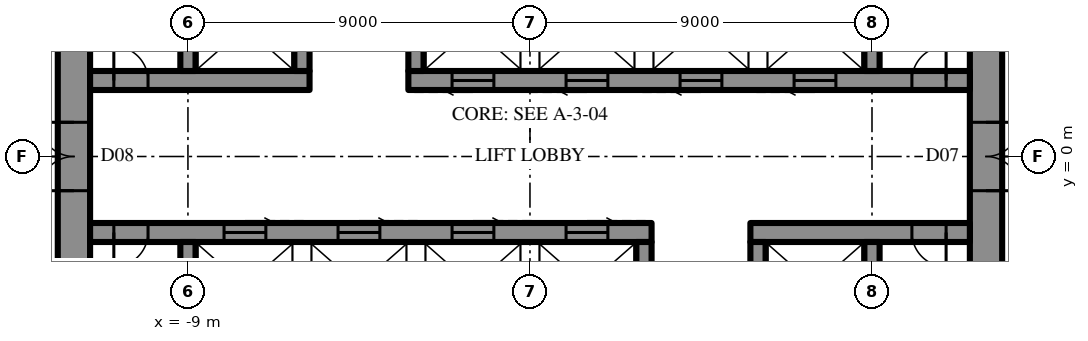
"""IFC4 building model, lengths in metres.
Left out: names, types, materials, properties, quantities, classifications, styles, units other than length and angle.
Written with IfcOpenShell. Run it as: python <this file> out.ifc"""

import sys

from ifc_helpers import new_model, si_unit, direction, frame, frame_2d, origin, place, context, subcontext, project, spatial, rectangle, extrude, element, fill, save


model = new_model("IFC4")
c1 = context("Model", 3, precision=1e-05, world=origin(), true_north=direction((0.0, 1.0)))
c2 = subcontext(c1, "Body", "Model", "MODEL_VIEW")
j1 = project(units=[si_unit("LENGTHUNIT", "METRE"), si_unit("PLANEANGLEUNIT", "RADIAN")], contexts=[c1])
p1 = place(None, origin())
s1 = spatial("IfcSite", under=j1, at=p1, CompositionType="ELEMENT")
p2 = place(p1, origin())
s2 = spatial("IfcBuilding", under=s1, at=p2, CompositionType="ELEMENT")
p3 = place(p2, frame((0.0, 0.0, 370.3)))
s3 = spatial("IfcBuildingStorey", under=s2, at=p3, CompositionType="ELEMENT", Elevation=370.3)
p4 = place(p3, frame((12.0, -10.7, 0.0), z_axis=(0.0, 0.0, 1.0), x_axis=(0.0, 1.0, 0.0)))
e1 = element("IfcWall", 1, at=p4, inside=s3, PredefinedType="SHEAR", context=c2, shape_type="SweptSolid", body=[
    extrude(rectangle(XDim=21.4, YDim=0.85, at=frame_2d((10.7, 0.0))), origin(), (0.0, 0.0, 1.0), 4.2),
])
p5 = place(p4, frame((9.8, 0.0, 0.0)))
e2 = element("IfcOpeningElement", 2, at=p5, cuts=e1, PredefinedType="OPENING", context=c2, shape_type="SweptSolid", body=[
    extrude(rectangle(XDim=1.8, YDim=2.4, at=frame_2d((0.9, 1.2))), frame((0.0, 0.435, 0.0), z_axis=(0.0, -1.0, 0.0), x_axis=(1.0, 0.0, 0.0)), (0.0, 0.0, 1.0), 0.87),
])
p6 = place(p3, frame((-12.0, 10.7, 0.0), z_axis=(0.0, 0.0, 1.0), x_axis=(0.0, -1.0, 0.0)))
e3 = element("IfcWall", 3, at=p6, inside=s3, PredefinedType="SHEAR", context=c2, shape_type="SweptSolid", body=[
    extrude(rectangle(XDim=21.4, YDim=0.85, at=frame_2d((10.7, 0.0))), origin(), (0.0, 0.0, 1.0), 4.2),
])
p7 = place(p6, frame((9.8, 0.0, 0.0)))
e4 = element("IfcOpeningElement", 4, at=p7, cuts=e3, PredefinedType="OPENING", context=c2, shape_type="SweptSolid", body=[
    extrude(rectangle(XDim=1.8, YDim=2.4, at=frame_2d((0.9, 1.2))), frame((0.0, 0.435, 0.0), z_axis=(0.0, -1.0, 0.0), x_axis=(1.0, 0.0, 0.0)), (0.0, 0.0, 1.0), 0.87),
])
p8 = place(p3, frame((-11.575, 2.0, 0.0), z_axis=(0.0, 0.0, 1.0), x_axis=(1.0, 0.0, 0.0)))
e5 = element("IfcWall", 5, at=p8, inside=s3, PredefinedType="SHEAR", context=c2, shape_type="SweptSolid", body=[
    extrude(rectangle(XDim=5.775, YDim=0.5, at=frame_2d((2.887, 0.0))), origin(), (0.0, 0.0, 1.0), 4.2),
])
p9 = place(p8, frame((0.625, 0.0, 0.0)))
e6 = element("IfcOpeningElement", 6, at=p9, cuts=e5, PredefinedType="OPENING", context=c2, shape_type="SweptSolid", body=[
    extrude(rectangle(XDim=0.9, YDim=2.2, at=frame_2d((0.45, 1.1))), frame((0.0, 0.26, 0.0), z_axis=(0.0, -1.0, 0.0), x_axis=(1.0, 0.0, 0.0)), (0.0, 0.0, 1.0), 0.52),
])
p10 = place(p3, frame((-3.2, 2.0, 0.0), z_axis=(0.0, 0.0, 1.0), x_axis=(1.0, 0.0, 0.0)))
e7 = element("IfcWall", 7, at=p10, inside=s3, PredefinedType="SHEAR", context=c2, shape_type="SweptSolid", body=[
    extrude(rectangle(XDim=14.775, YDim=0.5, at=frame_2d((7.387, 0.0))), origin(), (0.0, 0.0, 1.0), 4.2),
])
p11 = place(p10, frame((13.25, 0.0, 0.0)))
e8 = element("IfcOpeningElement", 8, at=p11, cuts=e7, PredefinedType="OPENING", context=c2, shape_type="SweptSolid", body=[
    extrude(rectangle(XDim=0.9, YDim=2.2, at=frame_2d((0.45, 1.1))), frame((0.0, 0.26, 0.0), z_axis=(0.0, -1.0, 0.0), x_axis=(1.0, 0.0, 0.0)), (0.0, 0.0, 1.0), 0.52),
])
p12 = place(p10, frame((1.15, 0.0, 0.0)))
e9 = element("IfcOpeningElement", 9, at=p12, cuts=e7, PredefinedType="OPENING", context=c2, shape_type="SweptSolid", body=[
    extrude(rectangle(XDim=1.1, YDim=2.2, at=frame_2d((0.55, 1.1))), frame((0.0, 0.26, 0.0), z_axis=(0.0, -1.0, 0.0), x_axis=(1.0, 0.0, 0.0)), (0.0, 0.0, 1.0), 0.52),
])
p13 = place(p10, frame((4.15, 0.0, 0.0)))
e10 = element("IfcOpeningElement", 10, at=p13, cuts=e7, PredefinedType="OPENING", context=c2, shape_type="SweptSolid", body=[
    extrude(rectangle(XDim=1.1, YDim=2.2, at=frame_2d((0.55, 1.1))), frame((0.0, 0.26, 0.0), z_axis=(0.0, -1.0, 0.0), x_axis=(1.0, 0.0, 0.0)), (0.0, 0.0, 1.0), 0.52),
])
p14 = place(p10, frame((7.15, 0.0, 0.0)))
e11 = element("IfcOpeningElement", 11, at=p14, cuts=e7, PredefinedType="OPENING", context=c2, shape_type="SweptSolid", body=[
    extrude(rectangle(XDim=1.1, YDim=2.2, at=frame_2d((0.55, 1.1))), frame((0.0, 0.26, 0.0), z_axis=(0.0, -1.0, 0.0), x_axis=(1.0, 0.0, 0.0)), (0.0, 0.0, 1.0), 0.52),
])
p15 = place(p10, frame((10.15, 0.0, 0.0)))
e12 = element("IfcOpeningElement", 12, at=p15, cuts=e7, PredefinedType="OPENING", context=c2, shape_type="SweptSolid", body=[
    extrude(rectangle(XDim=1.1, YDim=2.2, at=frame_2d((0.55, 1.1))), frame((0.0, 0.26, 0.0), z_axis=(0.0, -1.0, 0.0), x_axis=(1.0, 0.0, 0.0)), (0.0, 0.0, 1.0), 0.52),
])
for number, where, z_axis, x_axis in (
    (13, (-9.0, 2.25, 0.0), (0.0, 0.0, 1.0), (0.0, 1.0, 0.0)),
    (14, (-6.0, 2.25, 0.0), (0.0, 0.0, 1.0), (0.0, 1.0, 0.0)),
    (15, (-3.0, 2.25, 0.0), (0.0, 0.0, 1.0), (0.0, 1.0, 0.0)),
    (16, (9.0, 2.25, 0.0), (0.0, 0.0, 1.0), (0.0, 1.0, 0.0)),
):
    element("IfcWall", number, at=place(p3, frame(where, z_axis=z_axis, x_axis=x_axis)), inside=s3, PredefinedType="SHEAR", context=c2, shape_type="SweptSolid", body=[
        extrude(rectangle(XDim=2.3, YDim=0.4, at=frame_2d((1.15, 0.0))), origin(), (0.0, 0.0, 1.0), 4.2),
    ])
p16 = place(p3, frame((11.575, -2.0, 0.0), z_axis=(0.0, 0.0, 1.0), x_axis=(-1.0, 0.0, 0.0)))
e17 = element("IfcWall", 17, at=p16, inside=s3, PredefinedType="SHEAR", context=c2, shape_type="SweptSolid", body=[
    extrude(rectangle(XDim=5.775, YDim=0.5, at=frame_2d((2.887, 0.0))), origin(), (0.0, 0.0, 1.0), 4.2),
])
p17 = place(p16, frame((0.625, 0.0, 0.0)))
e18 = element("IfcOpeningElement", 18, at=p17, cuts=e17, PredefinedType="OPENING", context=c2, shape_type="SweptSolid", body=[
    extrude(rectangle(XDim=0.9, YDim=2.2, at=frame_2d((0.45, 1.1))), frame((0.0, 0.26, 0.0), z_axis=(0.0, -1.0, 0.0), x_axis=(1.0, 0.0, 0.0)), (0.0, 0.0, 1.0), 0.52),
])
p18 = place(p3, frame((3.2, -2.0, 0.0), z_axis=(0.0, 0.0, 1.0), x_axis=(-1.0, 0.0, 0.0)))
e19 = element("IfcWall", 19, at=p18, inside=s3, PredefinedType="SHEAR", context=c2, shape_type="SweptSolid", body=[
    extrude(rectangle(XDim=14.775, YDim=0.5, at=frame_2d((7.387, 0.0))), origin(), (0.0, 0.0, 1.0), 4.2),
])
p19 = place(p18, frame((13.25, 0.0, 0.0)))
e20 = element("IfcOpeningElement", 20, at=p19, cuts=e19, PredefinedType="OPENING", context=c2, shape_type="SweptSolid", body=[
    extrude(rectangle(XDim=0.9, YDim=2.2, at=frame_2d((0.45, 1.1))), frame((0.0, 0.26, 0.0), z_axis=(0.0, -1.0, 0.0), x_axis=(1.0, 0.0, 0.0)), (0.0, 0.0, 1.0), 0.52),
])
p20 = place(p18, frame((1.15, 0.0, 0.0)))
e21 = element("IfcOpeningElement", 21, at=p20, cuts=e19, PredefinedType="OPENING", context=c2, shape_type="SweptSolid", body=[
    extrude(rectangle(XDim=1.1, YDim=2.2, at=frame_2d((0.55, 1.1))), frame((0.0, 0.26, 0.0), z_axis=(0.0, -1.0, 0.0), x_axis=(1.0, 0.0, 0.0)), (0.0, 0.0, 1.0), 0.52),
])
p21 = place(p18, frame((4.15, 0.0, 0.0)))
e22 = element("IfcOpeningElement", 22, at=p21, cuts=e19, PredefinedType="OPENING", context=c2, shape_type="SweptSolid", body=[
    extrude(rectangle(XDim=1.1, YDim=2.2, at=frame_2d((0.55, 1.1))), frame((0.0, 0.26, 0.0), z_axis=(0.0, -1.0, 0.0), x_axis=(1.0, 0.0, 0.0)), (0.0, 0.0, 1.0), 0.52),
])
p22 = place(p18, frame((7.15, 0.0, 0.0)))
e23 = element("IfcOpeningElement", 23, at=p22, cuts=e19, PredefinedType="OPENING", context=c2, shape_type="SweptSolid", body=[
    extrude(rectangle(XDim=1.1, YDim=2.2, at=frame_2d((0.55, 1.1))), frame((0.0, 0.26, 0.0), z_axis=(0.0, -1.0, 0.0), x_axis=(1.0, 0.0, 0.0)), (0.0, 0.0, 1.0), 0.52),
])
p23 = place(p18, frame((10.15, 0.0, 0.0)))
e24 = element("IfcOpeningElement", 24, at=p23, cuts=e19, PredefinedType="OPENING", context=c2, shape_type="SweptSolid", body=[
    extrude(rectangle(XDim=1.1, YDim=2.2, at=frame_2d((0.55, 1.1))), frame((0.0, 0.26, 0.0), z_axis=(0.0, -1.0, 0.0), x_axis=(1.0, 0.0, 0.0)), (0.0, 0.0, 1.0), 0.52),
])
for number, where, z_axis, x_axis in (
    (25, (9.0, -2.25, 0.0), (0.0, 0.0, 1.0), (0.0, -1.0, 0.0)),
    (26, (6.0, -2.25, 0.0), (0.0, 0.0, 1.0), (0.0, -1.0, 0.0)),
    (27, (3.0, -2.25, 0.0), (0.0, 0.0, 1.0), (0.0, -1.0, 0.0)),
    (28, (-9.0, -2.25, 0.0), (0.0, 0.0, 1.0), (0.0, -1.0, 0.0)),
):
    element("IfcWall", number, at=place(p3, frame(where, z_axis=z_axis, x_axis=x_axis)), inside=s3, PredefinedType="SHEAR", context=c2, shape_type="SweptSolid", body=[
        extrude(rectangle(XDim=2.3, YDim=0.4, at=frame_2d((1.15, 0.0))), origin(), (0.0, 0.0, 1.0), 4.2),
    ])
p24 = place(p5, frame((1.8, 0.0, 0.0), z_axis=(0.0, 0.0, 1.0), x_axis=(-1.0, 0.0, 0.0)))
e29 = element("IfcDoor", 29, at=p24, inside=s3, OperationType="DOUBLE_DOOR_SINGLE_SWING", PredefinedType="DOOR", context=c2, shape_type="SweptSolid", body=[
    extrude(rectangle(XDim=1.8, YDim=2.4, at=frame_2d((0.9, 1.2))), frame((0.0, 0.025, 0.0), z_axis=(0.0, -1.0, 0.0), x_axis=(1.0, 0.0, 0.0)), (0.0, 0.0, 1.0), 0.05),
])
fill(e2, e29)
p25 = place(p7, frame((1.8, 0.0, 0.0), z_axis=(0.0, 0.0, 1.0), x_axis=(-1.0, 0.0, 0.0)))
e30 = element("IfcDoor", 30, at=p25, inside=s3, OperationType="DOUBLE_DOOR_SINGLE_SWING", PredefinedType="DOOR", context=c2, shape_type="SweptSolid", body=[
    extrude(rectangle(XDim=1.8, YDim=2.4, at=frame_2d((0.9, 1.2))), frame((0.0, 0.025, 0.0), z_axis=(0.0, -1.0, 0.0), x_axis=(1.0, 0.0, 0.0)), (0.0, 0.0, 1.0), 0.05),
])
fill(e4, e30)
p26 = place(p9, origin())
e31 = element("IfcDoor", 31, at=p26, inside=s3, OperationType="SINGLE_SWING_RIGHT", PredefinedType="DOOR", context=c2, shape_type="SweptSolid", body=[
    extrude(rectangle(XDim=0.9, YDim=2.2, at=frame_2d((0.45, 1.1))), frame((0.0, 0.025, 0.0), z_axis=(0.0, -1.0, 0.0), x_axis=(1.0, 0.0, 0.0)), (0.0, 0.0, 1.0), 0.05),
])
fill(e6, e31)
p27 = place(p11, origin())
e32 = element("IfcDoor", 32, at=p27, inside=s3, OperationType="SINGLE_SWING_LEFT", PredefinedType="DOOR", context=c2, shape_type="SweptSolid", body=[
    extrude(rectangle(XDim=0.9, YDim=2.2, at=frame_2d((0.45, 1.1))), frame((0.0, 0.025, 0.0), z_axis=(0.0, -1.0, 0.0), x_axis=(1.0, 0.0, 0.0)), (0.0, 0.0, 1.0), 0.05),
])
fill(e8, e32)
p28 = place(p17, origin())
e33 = element("IfcDoor", 33, at=p28, inside=s3, OperationType="SINGLE_SWING_RIGHT", PredefinedType="DOOR", context=c2, shape_type="SweptSolid", body=[
    extrude(rectangle(XDim=0.9, YDim=2.2, at=frame_2d((0.45, 1.1))), frame((0.0, 0.025, 0.0), z_axis=(0.0, -1.0, 0.0), x_axis=(1.0, 0.0, 0.0)), (0.0, 0.0, 1.0), 0.05),
])
fill(e18, e33)
p29 = place(p19, origin())
e34 = element("IfcDoor", 34, at=p29, inside=s3, OperationType="SINGLE_SWING_LEFT", PredefinedType="DOOR", context=c2, shape_type="SweptSolid", body=[
    extrude(rectangle(XDim=0.9, YDim=2.2, at=frame_2d((0.45, 1.1))), frame((0.0, 0.025, 0.0), z_axis=(0.0, -1.0, 0.0), x_axis=(1.0, 0.0, 0.0)), (0.0, 0.0, 1.0), 0.05),
])
fill(e20, e34)
p30 = place(p12, frame((1.1, 0.0, 0.0), z_axis=(0.0, 0.0, 1.0), x_axis=(-1.0, 0.0, 0.0)))
e35 = element("IfcDoor", 35, at=p30, inside=s3, OperationType="SLIDING_TO_LEFT", PredefinedType="DOOR", context=c2, shape_type="SweptSolid", body=[
    extrude(rectangle(XDim=1.1, YDim=2.2, at=frame_2d((0.55, 1.1))), frame((0.0, 0.025, 0.0), z_axis=(0.0, -1.0, 0.0), x_axis=(1.0, 0.0, 0.0)), (0.0, 0.0, 1.0), 0.05),
])
fill(e9, e35)
p31 = place(p13, frame((1.1, 0.0, 0.0), z_axis=(0.0, 0.0, 1.0), x_axis=(-1.0, 0.0, 0.0)))
e36 = element("IfcDoor", 36, at=p31, inside=s3, OperationType="SLIDING_TO_LEFT", PredefinedType="DOOR", context=c2, shape_type="SweptSolid", body=[
    extrude(rectangle(XDim=1.1, YDim=2.2, at=frame_2d((0.55, 1.1))), frame((0.0, 0.025, 0.0), z_axis=(0.0, -1.0, 0.0), x_axis=(1.0, 0.0, 0.0)), (0.0, 0.0, 1.0), 0.05),
])
fill(e10, e36)
p32 = place(p14, frame((1.1, 0.0, 0.0), z_axis=(0.0, 0.0, 1.0), x_axis=(-1.0, 0.0, 0.0)))
e37 = element("IfcDoor", 37, at=p32, inside=s3, OperationType="SLIDING_TO_LEFT", PredefinedType="DOOR", context=c2, shape_type="SweptSolid", body=[
    extrude(rectangle(XDim=1.1, YDim=2.2, at=frame_2d((0.55, 1.1))), frame((0.0, 0.025, 0.0), z_axis=(0.0, -1.0, 0.0), x_axis=(1.0, 0.0, 0.0)), (0.0, 0.0, 1.0), 0.05),
])
fill(e11, e37)
p33 = place(p15, frame((1.1, 0.0, 0.0), z_axis=(0.0, 0.0, 1.0), x_axis=(-1.0, 0.0, 0.0)))
e38 = element("IfcDoor", 38, at=p33, inside=s3, OperationType="SLIDING_TO_LEFT", PredefinedType="DOOR", context=c2, shape_type="SweptSolid", body=[
    extrude(rectangle(XDim=1.1, YDim=2.2, at=frame_2d((0.55, 1.1))), frame((0.0, 0.025, 0.0), z_axis=(0.0, -1.0, 0.0), x_axis=(1.0, 0.0, 0.0)), (0.0, 0.0, 1.0), 0.05),
])
fill(e12, e38)
p34 = place(p20, frame((1.1, 0.0, 0.0), z_axis=(0.0, 0.0, 1.0), x_axis=(-1.0, 0.0, 0.0)))
e39 = element("IfcDoor", 39, at=p34, inside=s3, OperationType="SLIDING_TO_LEFT", PredefinedType="DOOR", context=c2, shape_type="SweptSolid", body=[
    extrude(rectangle(XDim=1.1, YDim=2.2, at=frame_2d((0.55, 1.1))), frame((0.0, 0.025, 0.0), z_axis=(0.0, -1.0, 0.0), x_axis=(1.0, 0.0, 0.0)), (0.0, 0.0, 1.0), 0.05),
])
fill(e21, e39)
p35 = place(p21, frame((1.1, 0.0, 0.0), z_axis=(0.0, 0.0, 1.0), x_axis=(-1.0, 0.0, 0.0)))
e40 = element("IfcDoor", 40, at=p35, inside=s3, OperationType="SLIDING_TO_LEFT", PredefinedType="DOOR", context=c2, shape_type="SweptSolid", body=[
    extrude(rectangle(XDim=1.1, YDim=2.2, at=frame_2d((0.55, 1.1))), frame((0.0, 0.025, 0.0), z_axis=(0.0, -1.0, 0.0), x_axis=(1.0, 0.0, 0.0)), (0.0, 0.0, 1.0), 0.05),
])
fill(e22, e40)
p36 = place(p22, frame((1.1, 0.0, 0.0), z_axis=(0.0, 0.0, 1.0), x_axis=(-1.0, 0.0, 0.0)))
e41 = element("IfcDoor", 41, at=p36, inside=s3, OperationType="SLIDING_TO_LEFT", PredefinedType="DOOR", context=c2, shape_type="SweptSolid", body=[
    extrude(rectangle(XDim=1.1, YDim=2.2, at=frame_2d((0.55, 1.1))), frame((0.0, 0.025, 0.0), z_axis=(0.0, -1.0, 0.0), x_axis=(1.0, 0.0, 0.0)), (0.0, 0.0, 1.0), 0.05),
])
fill(e23, e41)
p37 = place(p23, frame((1.1, 0.0, 0.0), z_axis=(0.0, 0.0, 1.0), x_axis=(-1.0, 0.0, 0.0)))
e42 = element("IfcDoor", 42, at=p37, inside=s3, OperationType="SLIDING_TO_LEFT", PredefinedType="DOOR", context=c2, shape_type="SweptSolid", body=[
    extrude(rectangle(XDim=1.1, YDim=2.2, at=frame_2d((0.55, 1.1))), frame((0.0, 0.025, 0.0), z_axis=(0.0, -1.0, 0.0), x_axis=(1.0, 0.0, 0.0)), (0.0, 0.0, 1.0), 0.05),
])
fill(e24, e42)
save(model, sys.argv[1])
